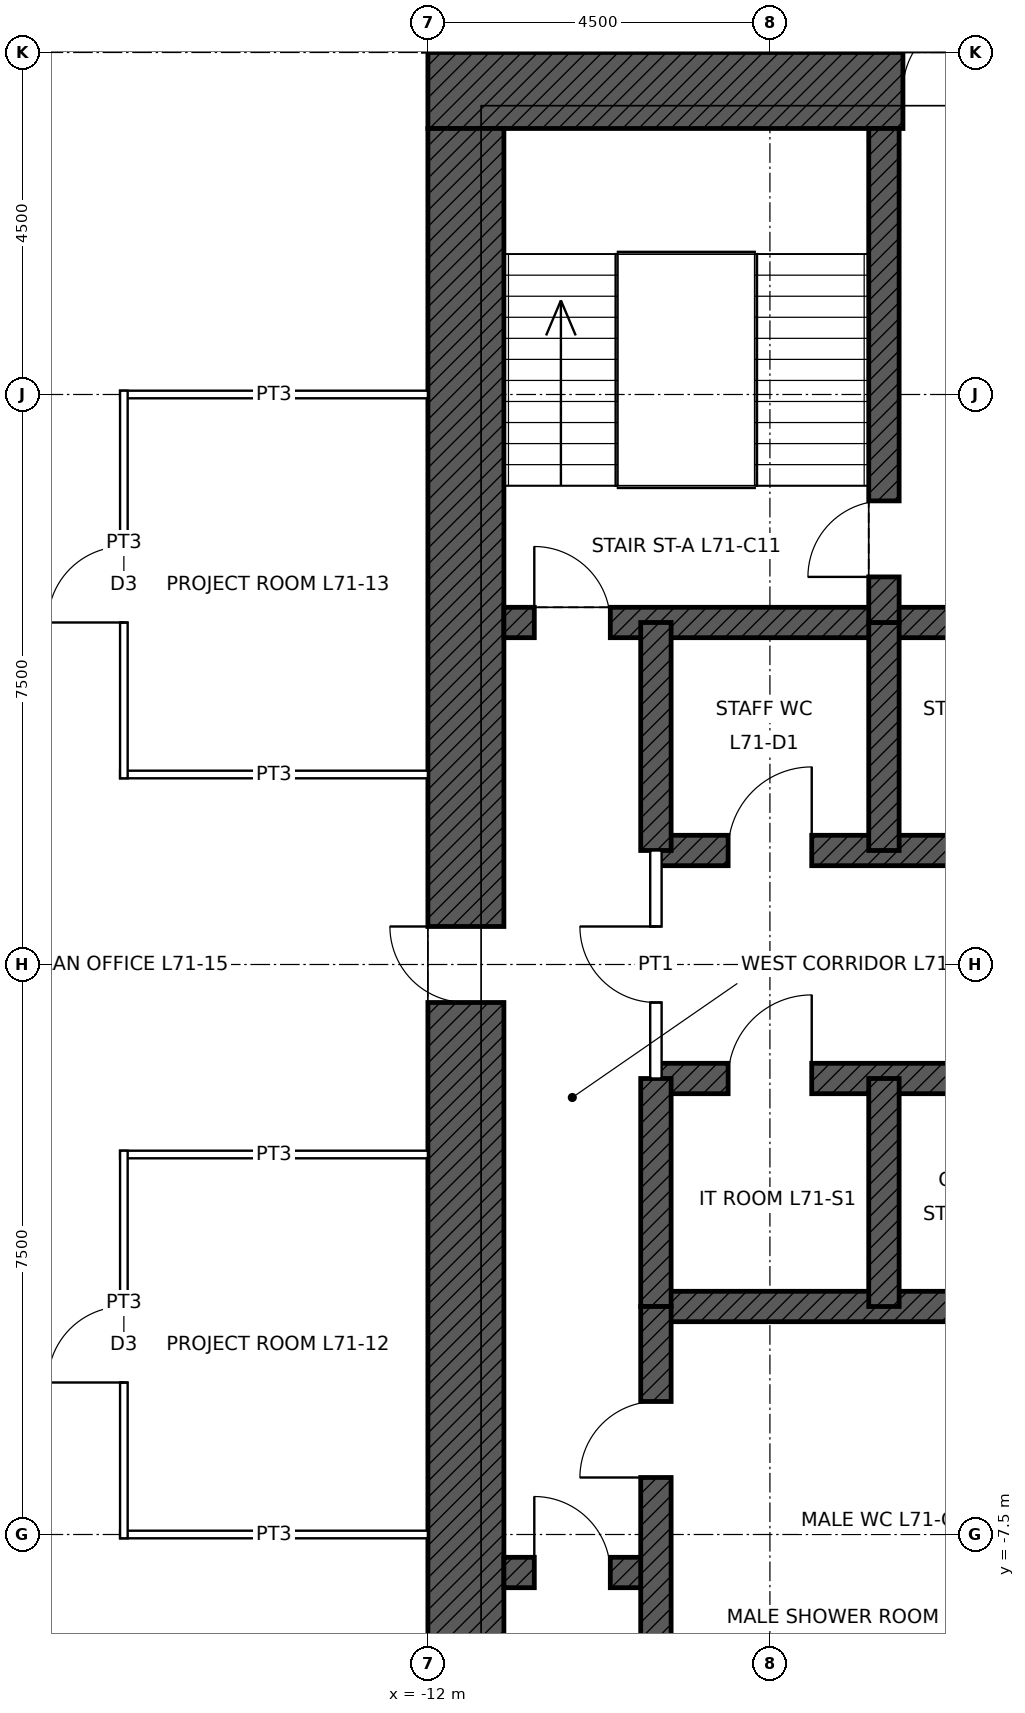
"""IFC4 building model, lengths in metres.
Left out: names, types, materials, properties, quantities, classifications, styles, units other than length and angle.
Written with IfcOpenShell. Run it as: python <this file> out.ifc"""

import sys

from ifc_helpers import new_model, si_unit, direction, frame, frame_2d, origin, place, context, subcontext, project, spatial, rectangle, extrude, element, fill, save


model = new_model("IFC4")
c1 = context("Model", 3, precision=1e-05, world=origin(), true_north=direction((0.0, 1.0)))
c2 = subcontext(c1, "Body", "Model", "MODEL_VIEW")
j1 = project(units=[si_unit("LENGTHUNIT", "METRE"), si_unit("PLANEANGLEUNIT", "RADIAN")], contexts=[c1])
p1 = place(None, origin())
s1 = spatial("IfcSite", under=j1, at=p1, CompositionType="ELEMENT")
p2 = place(p1, origin())
s2 = spatial("IfcBuilding", under=s1, at=p2, CompositionType="ELEMENT")
p3 = place(p2, frame((0.0, 0.0, 319.9)))
s3 = spatial("IfcBuildingStorey", under=s2, at=p3, CompositionType="ELEMENT", Elevation=319.9)
p4 = place(p3, frame((-12.0, 11.5, 0.0), z_axis=(0.0, 0.0, 1.0), x_axis=(1.0, 0.0, 0.0)))
e1 = element("IfcWall", 1, at=p4, inside=s3, PredefinedType="SHEAR", context=c2, shape_type="SweptSolid", body=[
    extrude(rectangle(XDim=24.0, YDim=1.0, at=frame_2d((12.0, 0.0))), origin(), (0.0, 0.0, 1.0), 4.0),
])
p5 = place(p4, frame((6.25, 0.0, 0.0)))
e2 = element("IfcOpeningElement", 2, at=p5, cuts=e1, PredefinedType="OPENING", context=c2, shape_type="SweptSolid", body=[
    extrude(rectangle(XDim=1.0, YDim=2.4, at=frame_2d((0.5, 1.2))), frame((0.0, 0.51, 0.0), z_axis=(0.0, -1.0, 0.0), x_axis=(1.0, 0.0, 0.0)), (0.0, 0.0, 1.0), 1.02),
])
p6 = place(p4, frame((16.75, 0.0, 0.0)))
e3 = element("IfcOpeningElement", 3, at=p6, cuts=e1, PredefinedType="OPENING", context=c2, shape_type="SweptSolid", body=[
    extrude(rectangle(XDim=1.0, YDim=2.4, at=frame_2d((0.5, 1.2))), frame((0.0, 0.51, 0.0), z_axis=(0.0, -1.0, 0.0), x_axis=(1.0, 0.0, 0.0)), (0.0, 0.0, 1.0), 1.02),
])
p7 = place(p3, frame((-11.5, -11.0, 0.0), z_axis=(0.0, 0.0, 1.0), x_axis=(0.0, 1.0, 0.0)))
e4 = element("IfcWall", 4, at=p7, inside=s3, PredefinedType="SHEAR", context=c2, shape_type="SweptSolid", body=[
    extrude(rectangle(XDim=22.0, YDim=1.0, at=frame_2d((11.0, 0.0))), origin(), (0.0, 0.0, 1.0), 4.0),
])
p8 = place(p7, frame((10.5, 0.0, 0.0)))
e5 = element("IfcOpeningElement", 5, at=p8, cuts=e4, PredefinedType="OPENING", context=c2, shape_type="SweptSolid", body=[
    extrude(rectangle(XDim=1.0, YDim=2.4, at=frame_2d((0.5, 1.2))), frame((0.0, 0.51, 0.0), z_axis=(0.0, -1.0, 0.0), x_axis=(1.0, 0.0, 0.0)), (0.0, 0.0, 1.0), 1.02),
])
p9 = place(p3, frame((-11.0, 4.5, 0.0), z_axis=(0.0, 0.0, 1.0), x_axis=(1.0, 0.0, 0.0)))
e6 = element("IfcWall", 6, at=p9, inside=s3, PredefinedType="SHEAR", context=c2, shape_type="SweptSolid", body=[
    extrude(rectangle(XDim=22.0, YDim=0.4, at=frame_2d((11.0, 0.0))), origin(), (0.0, 0.0, 1.0), 4.0),
])
p10 = place(p9, frame((0.4, 0.0, 0.0)))
e7 = element("IfcOpeningElement", 7, at=p10, cuts=e6, PredefinedType="OPENING", context=c2, shape_type="SweptSolid", body=[
    extrude(rectangle(XDim=1.0, YDim=2.1, at=frame_2d((0.5, 1.05))), frame((0.0, 0.21, 0.0), z_axis=(0.0, -1.0, 0.0), x_axis=(1.0, 0.0, 0.0)), (0.0, 0.0, 1.0), 0.42),
])
p11 = place(p9, frame((20.6, 0.0, 0.0)))
e8 = element("IfcOpeningElement", 8, at=p11, cuts=e6, PredefinedType="OPENING", context=c2, shape_type="SweptSolid", body=[
    extrude(rectangle(XDim=1.0, YDim=2.1, at=frame_2d((0.5, 1.05))), frame((0.0, 0.21, 0.0), z_axis=(0.0, -1.0, 0.0), x_axis=(1.0, 0.0, 0.0)), (0.0, 0.0, 1.0), 0.42),
])
p12 = place(p3, frame((-9.0, 1.5, 0.0), z_axis=(0.0, 0.0, 1.0), x_axis=(1.0, 0.0, 0.0)))
e9 = element("IfcWall", 9, at=p12, inside=s3, PredefinedType="SHEAR", context=c2, shape_type="SweptSolid", body=[
    extrude(rectangle(XDim=18.0, YDim=0.4, at=frame_2d((9.0, 0.0))), origin(), (0.0, 0.0, 1.0), 4.0),
])
p13 = place(p12, frame((0.95, 0.0, 0.0)))
e10 = element("IfcOpeningElement", 10, at=p13, cuts=e9, PredefinedType="OPENING", context=c2, shape_type="SweptSolid", body=[
    extrude(rectangle(XDim=1.1, YDim=2.1, at=frame_2d((0.55, 1.05))), frame((0.0, 0.21, 0.0), z_axis=(0.0, -1.0, 0.0), x_axis=(1.0, 0.0, 0.0)), (0.0, 0.0, 1.0), 0.42),
])
p14 = place(p12, frame((3.95, 0.0, 0.0)))
e11 = element("IfcOpeningElement", 11, at=p14, cuts=e9, PredefinedType="OPENING", context=c2, shape_type="SweptSolid", body=[
    extrude(rectangle(XDim=1.1, YDim=2.1, at=frame_2d((0.55, 1.05))), frame((0.0, 0.21, 0.0), z_axis=(0.0, -1.0, 0.0), x_axis=(1.0, 0.0, 0.0)), (0.0, 0.0, 1.0), 0.42),
])
p15 = place(p12, frame((6.95, 0.0, 0.0)))
e12 = element("IfcOpeningElement", 12, at=p15, cuts=e9, PredefinedType="OPENING", context=c2, shape_type="SweptSolid", body=[
    extrude(rectangle(XDim=1.1, YDim=2.1, at=frame_2d((0.55, 1.05))), frame((0.0, 0.21, 0.0), z_axis=(0.0, -1.0, 0.0), x_axis=(1.0, 0.0, 0.0)), (0.0, 0.0, 1.0), 0.42),
])
p16 = place(p12, frame((9.95, 0.0, 0.0)))
e13 = element("IfcOpeningElement", 13, at=p16, cuts=e9, PredefinedType="OPENING", context=c2, shape_type="SweptSolid", body=[
    extrude(rectangle(XDim=1.1, YDim=2.1, at=frame_2d((0.55, 1.05))), frame((0.0, 0.21, 0.0), z_axis=(0.0, -1.0, 0.0), x_axis=(1.0, 0.0, 0.0)), (0.0, 0.0, 1.0), 0.42),
])
p17 = place(p12, frame((12.95, 0.0, 0.0)))
e14 = element("IfcOpeningElement", 14, at=p17, cuts=e9, PredefinedType="OPENING", context=c2, shape_type="SweptSolid", body=[
    extrude(rectangle(XDim=1.1, YDim=2.1, at=frame_2d((0.55, 1.05))), frame((0.0, 0.21, 0.0), z_axis=(0.0, -1.0, 0.0), x_axis=(1.0, 0.0, 0.0)), (0.0, 0.0, 1.0), 0.42),
])
p18 = place(p12, frame((15.95, 0.0, 0.0)))
e15 = element("IfcOpeningElement", 15, at=p18, cuts=e9, PredefinedType="OPENING", context=c2, shape_type="SweptSolid", body=[
    extrude(rectangle(XDim=1.1, YDim=2.1, at=frame_2d((0.55, 1.05))), frame((0.0, 0.21, 0.0), z_axis=(0.0, -1.0, 0.0), x_axis=(1.0, 0.0, 0.0)), (0.0, 0.0, 1.0), 0.42),
])
p19 = place(p3, frame((-9.0, -1.5, 0.0), z_axis=(0.0, 0.0, 1.0), x_axis=(1.0, 0.0, 0.0)))
e16 = element("IfcWall", 16, at=p19, inside=s3, PredefinedType="SHEAR", context=c2, shape_type="SweptSolid", body=[
    extrude(rectangle(XDim=18.0, YDim=0.4, at=frame_2d((9.0, 0.0))), origin(), (0.0, 0.0, 1.0), 4.0),
])
p20 = place(p19, frame((9.95, 0.0, 0.0)))
e17 = element("IfcOpeningElement", 17, at=p20, cuts=e16, PredefinedType="OPENING", context=c2, shape_type="SweptSolid", body=[
    extrude(rectangle(XDim=1.1, YDim=2.1, at=frame_2d((0.55, 1.05))), frame((0.0, 0.21, 0.0), z_axis=(0.0, -1.0, 0.0), x_axis=(1.0, 0.0, 0.0)), (0.0, 0.0, 1.0), 0.42),
])
p21 = place(p19, frame((12.95, 0.0, 0.0)))
e18 = element("IfcOpeningElement", 18, at=p21, cuts=e16, PredefinedType="OPENING", context=c2, shape_type="SweptSolid", body=[
    extrude(rectangle(XDim=1.1, YDim=2.1, at=frame_2d((0.55, 1.05))), frame((0.0, 0.21, 0.0), z_axis=(0.0, -1.0, 0.0), x_axis=(1.0, 0.0, 0.0)), (0.0, 0.0, 1.0), 0.42),
])
p22 = place(p19, frame((15.95, 0.0, 0.0)))
e19 = element("IfcOpeningElement", 19, at=p22, cuts=e16, PredefinedType="OPENING", context=c2, shape_type="SweptSolid", body=[
    extrude(rectangle(XDim=1.1, YDim=2.1, at=frame_2d((0.55, 1.05))), frame((0.0, 0.21, 0.0), z_axis=(0.0, -1.0, 0.0), x_axis=(1.0, 0.0, 0.0)), (0.0, 0.0, 1.0), 0.42),
])
p23 = place(p19, frame((0.95, 0.0, 0.0)))
e20 = element("IfcOpeningElement", 20, at=p23, cuts=e16, PredefinedType="OPENING", context=c2, shape_type="SweptSolid", body=[
    extrude(rectangle(XDim=1.1, YDim=2.1, at=frame_2d((0.55, 1.05))), frame((0.0, 0.21, 0.0), z_axis=(0.0, -1.0, 0.0), x_axis=(1.0, 0.0, 0.0)), (0.0, 0.0, 1.0), 0.42),
])
p24 = place(p19, frame((3.95, 0.0, 0.0)))
e21 = element("IfcOpeningElement", 21, at=p24, cuts=e16, PredefinedType="OPENING", context=c2, shape_type="SweptSolid", body=[
    extrude(rectangle(XDim=1.1, YDim=2.1, at=frame_2d((0.55, 1.05))), frame((0.0, 0.21, 0.0), z_axis=(0.0, -1.0, 0.0), x_axis=(1.0, 0.0, 0.0)), (0.0, 0.0, 1.0), 0.42),
])
p25 = place(p19, frame((6.95, 0.0, 0.0)))
e22 = element("IfcOpeningElement", 22, at=p25, cuts=e16, PredefinedType="OPENING", context=c2, shape_type="SweptSolid", body=[
    extrude(rectangle(XDim=1.1, YDim=2.1, at=frame_2d((0.55, 1.05))), frame((0.0, 0.21, 0.0), z_axis=(0.0, -1.0, 0.0), x_axis=(1.0, 0.0, 0.0)), (0.0, 0.0, 1.0), 0.42),
])
p26 = place(p3, frame((-9.0, -4.5, 0.0), z_axis=(0.0, 0.0, 1.0), x_axis=(1.0, 0.0, 0.0)))
e23 = element("IfcWall", 23, at=p26, inside=s3, PredefinedType="SHEAR", context=c2, shape_type="SweptSolid", body=[
    extrude(rectangle(XDim=18.0, YDim=0.4, at=frame_2d((9.0, 0.0))), origin(), (0.0, 0.0, 1.0), 4.0),
])
p27 = place(p3, frame((-11.0, -8.0, 0.0), z_axis=(0.0, 0.0, 1.0), x_axis=(1.0, 0.0, 0.0)))
e24 = element("IfcWall", 24, at=p27, inside=s3, PredefinedType="SHEAR", context=c2, shape_type="SweptSolid", body=[
    extrude(rectangle(XDim=2.0, YDim=0.4, at=frame_2d((1.0, 0.0))), origin(), (0.0, 0.0, 1.0), 4.0),
])
p28 = place(p27, frame((0.4, 0.0, 0.0)))
e25 = element("IfcOpeningElement", 25, at=p28, cuts=e24, PredefinedType="OPENING", context=c2, shape_type="SweptSolid", body=[
    extrude(rectangle(XDim=1.0, YDim=2.1, at=frame_2d((0.5, 1.05))), frame((0.0, 0.21, 0.0), z_axis=(0.0, -1.0, 0.0), x_axis=(1.0, 0.0, 0.0)), (0.0, 0.0, 1.0), 0.42),
])
for number, where, z_axis, x_axis in (
    (26, (-9.0, 1.5, 0.0), (0.0, 0.0, 1.0), (0.0, 1.0, 0.0)),
    (27, (-9.0, -4.5, 0.0), (0.0, 0.0, 1.0), (0.0, 1.0, 0.0)),
    (28, (-6.0, 1.5, 0.0), (0.0, 0.0, 1.0), (0.0, 1.0, 0.0)),
    (29, (-6.0, -4.5, 0.0), (0.0, 0.0, 1.0), (0.0, 1.0, 0.0)),
):
    element("IfcWall", number, at=place(p3, frame(where, z_axis=z_axis, x_axis=x_axis)), inside=s3, PredefinedType="SHEAR", context=c2, shape_type="SweptSolid", body=[
        extrude(rectangle(XDim=3.0, YDim=0.4, at=frame_2d((1.5, 0.0))), origin(), (0.0, 0.0, 1.0), 4.0),
    ])
p29 = place(p3, frame((-6.0, 4.5, 0.0), z_axis=(0.0, 0.0, 1.0), x_axis=(0.0, 1.0, 0.0)))
e30 = element("IfcWall", 30, at=p29, inside=s3, PredefinedType="SHEAR", context=c2, shape_type="SweptSolid", body=[
    extrude(rectangle(XDim=6.5, YDim=0.4, at=frame_2d((3.25, 0.0))), origin(), (0.0, 0.0, 1.0), 4.0),
])
p30 = place(p29, frame((0.6, 0.0, 0.0)))
e31 = element("IfcOpeningElement", 31, at=p30, cuts=e30, PredefinedType="OPENING", context=c2, shape_type="SweptSolid", body=[
    extrude(rectangle(XDim=1.0, YDim=2.1, at=frame_2d((0.5, 1.05))), frame((0.0, 0.21, 0.0), z_axis=(0.0, -1.0, 0.0), x_axis=(1.0, 0.0, 0.0)), (0.0, 0.0, 1.0), 0.42),
])
p31 = place(p3, frame((-9.0, -11.0, 0.0), z_axis=(0.0, 0.0, 1.0), x_axis=(0.0, 1.0, 0.0)))
e32 = element("IfcWall", 32, at=p31, inside=s3, PredefinedType="SHEAR", context=c2, shape_type="SweptSolid", body=[
    extrude(rectangle(XDim=6.5, YDim=0.4, at=frame_2d((3.25, 0.0))), origin(), (0.0, 0.0, 1.0), 4.0),
])
p32 = place(p31, frame((4.25, 0.0, 0.0)))
e33 = element("IfcOpeningElement", 33, at=p32, cuts=e32, PredefinedType="OPENING", context=c2, shape_type="SweptSolid", body=[
    extrude(rectangle(XDim=1.0, YDim=2.1, at=frame_2d((0.5, 1.05))), frame((0.0, 0.21, 0.0), z_axis=(0.0, -1.0, 0.0), x_axis=(1.0, 0.0, 0.0)), (0.0, 0.0, 1.0), 0.42),
])
p33 = place(p3, frame((-16.05, -7.5, 0.0), z_axis=(0.0, 0.0, 1.0), x_axis=(1.0, 0.0, 0.0)))
e34 = element("IfcWall", 34, at=p33, inside=s3, PredefinedType="PARTITIONING", context=c2, shape_type="SweptSolid", body=[
    extrude(rectangle(XDim=4.05, YDim=0.1, at=frame_2d((2.025, 0.0))), origin(), (0.0, 0.0, 1.0), 3.243),
])
for number, where, z_axis, x_axis in (
    (35, (-16.05, -2.5, 0.0), (0.0, 0.0, 1.0), (1.0, 0.0, 0.0)),
    (36, (-16.05, 2.5, 0.0), (0.0, 0.0, 1.0), (1.0, 0.0, 0.0)),
):
    element("IfcWall", number, at=place(p3, frame(where, z_axis=z_axis, x_axis=x_axis)), inside=s3, PredefinedType="PARTITIONING", context=c2, shape_type="SweptSolid", body=[
        extrude(rectangle(XDim=4.05, YDim=0.1, at=frame_2d((2.025, 0.0))), origin(), (0.0, 0.0, 1.0), 3.85),
    ])
p34 = place(p3, frame((-16.05, 7.5, 0.0), z_axis=(0.0, 0.0, 1.0), x_axis=(1.0, 0.0, 0.0)))
e37 = element("IfcWall", 37, at=p34, inside=s3, PredefinedType="PARTITIONING", context=c2, shape_type="SweptSolid", body=[
    extrude(rectangle(XDim=4.05, YDim=0.1, at=frame_2d((2.025, 0.0))), origin(), (0.0, 0.0, 1.0), 3.243),
])
p35 = place(p3, frame((-16.0, -7.55, 0.0), z_axis=(0.0, 0.0, 1.0), x_axis=(0.0, 1.0, 0.0)))
e38 = element("IfcWall", 38, at=p35, inside=s3, PredefinedType="PARTITIONING", context=c2, shape_type="SweptSolid", body=[
    extrude(rectangle(XDim=5.1, YDim=0.1, at=frame_2d((2.55, 0.0))), origin(), (0.0, 0.0, 1.0), 3.85),
])
p36 = place(p35, frame((2.05, 0.0, 0.0)))
e39 = element("IfcOpeningElement", 39, at=p36, cuts=e38, PredefinedType="OPENING", context=c2, shape_type="SweptSolid", body=[
    extrude(rectangle(XDim=1.0, YDim=2.1, at=frame_2d((0.5, 1.05))), frame((0.0, 0.06, 0.0), z_axis=(0.0, -1.0, 0.0), x_axis=(1.0, 0.0, 0.0)), (0.0, 0.0, 1.0), 0.12),
])
p37 = place(p3, frame((-16.0, 2.45, 0.0), z_axis=(0.0, 0.0, 1.0), x_axis=(0.0, 1.0, 0.0)))
e40 = element("IfcWall", 40, at=p37, inside=s3, PredefinedType="PARTITIONING", context=c2, shape_type="SweptSolid", body=[
    extrude(rectangle(XDim=5.1, YDim=0.1, at=frame_2d((2.55, 0.0))), origin(), (0.0, 0.0, 1.0), 3.85),
])
p38 = place(p37, frame((2.05, 0.0, 0.0)))
e41 = element("IfcOpeningElement", 41, at=p38, cuts=e40, PredefinedType="OPENING", context=c2, shape_type="SweptSolid", body=[
    extrude(rectangle(XDim=1.0, YDim=2.1, at=frame_2d((0.5, 1.05))), frame((0.0, 0.06, 0.0), z_axis=(0.0, -1.0, 0.0), x_axis=(1.0, 0.0, 0.0)), (0.0, 0.0, 1.0), 0.12),
])
p39 = place(p3, frame((-9.0, -1.5, 0.0), z_axis=(0.0, 0.0, 1.0), x_axis=(0.0, 1.0, 0.0)))
e42 = element("IfcWall", 42, at=p39, inside=s3, PredefinedType="PARTITIONING", context=c2, shape_type="SweptSolid", body=[
    extrude(rectangle(XDim=3.0, YDim=0.15, at=frame_2d((1.5, 0.0))), origin(), (0.0, 0.0, 1.0), 3.75),
])
p40 = place(p39, frame((1.0, 0.0, 0.0)))
e43 = element("IfcOpeningElement", 43, at=p40, cuts=e42, PredefinedType="OPENING", context=c2, shape_type="SweptSolid", body=[
    extrude(rectangle(XDim=1.0, YDim=2.4, at=frame_2d((0.5, 1.2))), frame((0.0, 0.085, 0.0), z_axis=(0.0, -1.0, 0.0), x_axis=(1.0, 0.0, 0.0)), (0.0, 0.0, 1.0), 0.17),
])
p41 = place(p10, origin())
e44 = element("IfcDoor", 44, at=p41, inside=s3, OperationType="SINGLE_SWING_LEFT", PredefinedType="DOOR", context=c2, shape_type="SweptSolid", body=[
    extrude(rectangle(XDim=1.0, YDim=2.1, at=frame_2d((0.5, 1.05))), frame((0.0, 0.025, 0.0), z_axis=(0.0, -1.0, 0.0), x_axis=(1.0, 0.0, 0.0)), (0.0, 0.0, 1.0), 0.05),
])
fill(e7, e44)
p42 = place(p30, origin())
e45 = element("IfcDoor", 45, at=p42, inside=s3, OperationType="SINGLE_SWING_LEFT", PredefinedType="DOOR", context=c2, shape_type="SweptSolid", body=[
    extrude(rectangle(XDim=1.0, YDim=2.1, at=frame_2d((0.5, 1.05))), frame((0.0, 0.025, 0.0), z_axis=(0.0, -1.0, 0.0), x_axis=(1.0, 0.0, 0.0)), (0.0, 0.0, 1.0), 0.05),
])
fill(e31, e45)
p43 = place(p5, origin())
e46 = element("IfcDoor", 46, at=p43, inside=s3, OperationType="SINGLE_SWING_RIGHT", PredefinedType="DOOR", context=c2, shape_type="SweptSolid", body=[
    extrude(rectangle(XDim=1.0, YDim=2.4, at=frame_2d((0.5, 1.2))), frame((0.0, 0.485, 0.0), z_axis=(0.0, -1.0, 0.0), x_axis=(1.0, 0.0, 0.0)), (0.0, 0.0, 1.0), 0.05),
])
fill(e2, e46)
p44 = place(p8, origin())
e47 = element("IfcDoor", 47, at=p44, inside=s3, OperationType="SINGLE_SWING_RIGHT", PredefinedType="DOOR", context=c2, shape_type="SweptSolid", body=[
    extrude(rectangle(XDim=1.0, YDim=2.4, at=frame_2d((0.5, 1.2))), frame((0.0, 0.485, 0.0), z_axis=(0.0, -1.0, 0.0), x_axis=(1.0, 0.0, 0.0)), (0.0, 0.0, 1.0), 0.05),
])
fill(e5, e47)
p45 = place(p32, origin())
e48 = element("IfcDoor", 48, at=p45, inside=s3, OperationType="SINGLE_SWING_LEFT", PredefinedType="DOOR", context=c2, shape_type="SweptSolid", body=[
    extrude(rectangle(XDim=1.0, YDim=2.1, at=frame_2d((0.5, 1.05))), frame((0.0, 0.025, 0.0), z_axis=(0.0, -1.0, 0.0), x_axis=(1.0, 0.0, 0.0)), (0.0, 0.0, 1.0), 0.05),
])
fill(e33, e48)
p46 = place(p28, origin())
e49 = element("IfcDoor", 49, at=p46, inside=s3, OperationType="SINGLE_SWING_LEFT", PredefinedType="DOOR", context=c2, shape_type="SweptSolid", body=[
    extrude(rectangle(XDim=1.0, YDim=2.1, at=frame_2d((0.5, 1.05))), frame((0.0, 0.025, 0.0), z_axis=(0.0, -1.0, 0.0), x_axis=(1.0, 0.0, 0.0)), (0.0, 0.0, 1.0), 0.05),
])
fill(e25, e49)
p47 = place(p40, origin())
e50 = element("IfcDoor", 50, at=p47, inside=s3, OperationType="SINGLE_SWING_RIGHT", PredefinedType="DOOR", context=c2, shape_type="SweptSolid", body=[
    extrude(rectangle(XDim=1.0, YDim=2.4, at=frame_2d((0.5, 1.2))), frame((0.0, 0.025, 0.0), z_axis=(0.0, -1.0, 0.0), x_axis=(1.0, 0.0, 0.0)), (0.0, 0.0, 1.0), 0.05),
])
fill(e43, e50)
p48 = place(p13, origin())
e51 = element("IfcDoor", 51, at=p48, inside=s3, OperationType="SINGLE_SWING_RIGHT", PredefinedType="DOOR", context=c2, shape_type="SweptSolid", body=[
    extrude(rectangle(XDim=1.1, YDim=2.1, at=frame_2d((0.55, 1.05))), frame((0.0, 0.025, 0.0), z_axis=(0.0, -1.0, 0.0), x_axis=(1.0, 0.0, 0.0)), (0.0, 0.0, 1.0), 0.05),
])
fill(e10, e51)
p49 = place(p23, origin())
e52 = element("IfcDoor", 52, at=p49, inside=s3, OperationType="SINGLE_SWING_RIGHT", PredefinedType="DOOR", context=c2, shape_type="SweptSolid", body=[
    extrude(rectangle(XDim=1.1, YDim=2.1, at=frame_2d((0.55, 1.05))), frame((0.0, 0.025, 0.0), z_axis=(0.0, -1.0, 0.0), x_axis=(1.0, 0.0, 0.0)), (0.0, 0.0, 1.0), 0.05),
])
fill(e20, e52)
p50 = place(p36, origin())
e53 = element("IfcDoor", 53, at=p50, inside=s3, OperationType="SINGLE_SWING_LEFT", PredefinedType="DOOR", context=c2, shape_type="SweptSolid", body=[
    extrude(rectangle(XDim=1.0, YDim=2.1, at=frame_2d((0.5, 1.05))), frame((0.0, 0.025, 0.0), z_axis=(0.0, -1.0, 0.0), x_axis=(1.0, 0.0, 0.0)), (0.0, 0.0, 1.0), 0.05),
])
fill(e39, e53)
p51 = place(p38, origin())
e54 = element("IfcDoor", 54, at=p51, inside=s3, OperationType="SINGLE_SWING_LEFT", PredefinedType="DOOR", context=c2, shape_type="SweptSolid", body=[
    extrude(rectangle(XDim=1.0, YDim=2.1, at=frame_2d((0.5, 1.05))), frame((0.0, 0.025, 0.0), z_axis=(0.0, -1.0, 0.0), x_axis=(1.0, 0.0, 0.0)), (0.0, 0.0, 1.0), 0.05),
])
fill(e41, e54)
save(model, sys.argv[1])
